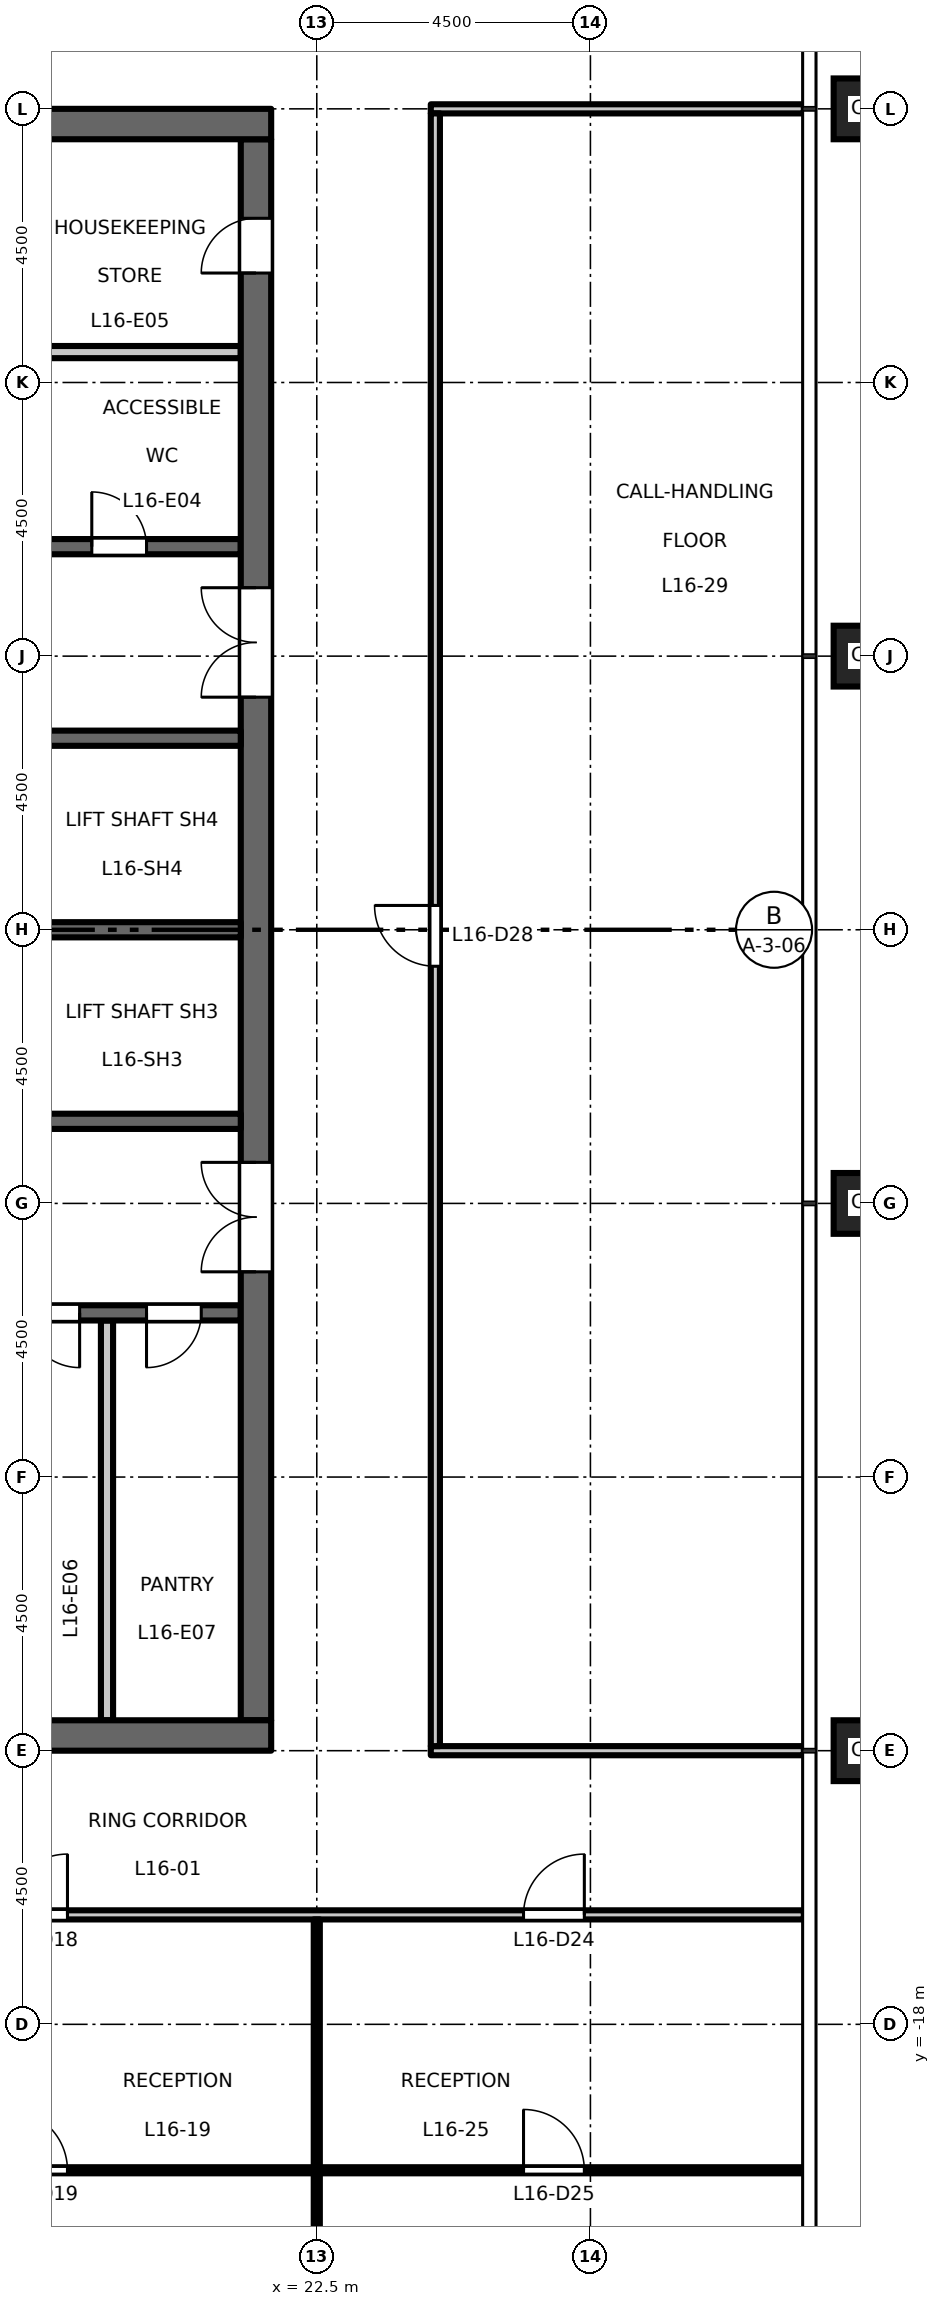
"""IFC4 building model, lengths in metres.
Left out: names, types, materials, properties, quantities, classifications, styles, units other than length and angle.
Written with IfcOpenShell. Run it as: python <this file> out.ifc"""

import sys

from ifc_helpers import new_model, si_unit, direction, frame, frame_2d, origin, origin_2d, place, context, subcontext, project, spatial, rectangle, hollow_rectangle, extrude, element, fill, save


model = new_model("IFC4")
c1 = context("Model", 3, precision=1e-05, world=origin(), true_north=direction((0.0, 1.0)))
c2 = subcontext(c1, "Body", "Model", "MODEL_VIEW")
j1 = project(units=[si_unit("LENGTHUNIT", "METRE"), si_unit("PLANEANGLEUNIT", "RADIAN")], contexts=[c1])
p1 = place(None, origin())
s1 = spatial("IfcSite", under=j1, at=p1, CompositionType="ELEMENT")
p2 = place(p1, origin())
s2 = spatial("IfcBuilding", under=s1, at=p2, CompositionType="ELEMENT")
p3 = place(p2, frame((0.0, 0.0, 76.2)))
s3 = spatial("IfcBuildingStorey", under=s2, at=p3, CompositionType="ELEMENT", Elevation=76.2)
for number, where, z_axis, x_axis in (
    (1, (31.5, -13.5, 0.0), (0.0, 0.0, 1.0), (1.0, 0.0, 0.0)),
    (2, (31.5, -4.5, 0.0), (0.0, 0.0, 1.0), (1.0, 0.0, 0.0)),
    (3, (31.5, 4.5, 0.0), (0.0, 0.0, 1.0), (1.0, 0.0, 0.0)),
    (4, (31.5, 13.5, 0.0), (0.0, 0.0, 1.0), (1.0, 0.0, 0.0)),
):
    element("IfcColumn", number, at=place(p3, frame(where, z_axis=z_axis, x_axis=x_axis)), inside=s3, PredefinedType="COLUMN", context=c2, shape_type="SweptSolid", body=[
        extrude(hollow_rectangle(XDim=1.0, YDim=1.0, WallThickness=0.06, at=origin_2d()), origin(), (0.0, 0.0, 1.0), 4.5),
    ])
p4 = place(p3, frame((17.0, 6.3, 0.0), z_axis=(0.0, 0.0, 1.0), x_axis=(1.0, 0.0, 0.0)))
e5 = element("IfcWall", 5, at=p4, inside=s3, PredefinedType="SHEAR", context=c2, shape_type="SweptSolid", body=[
    extrude(rectangle(XDim=4.25, YDim=0.25, at=frame_2d((2.125, 0.0))), origin(), (0.0, 0.0, 1.0), 4.35),
])
p5 = place(p4, frame((1.8, 0.0, 0.0)))
e6 = element("IfcOpeningElement", 6, at=p5, cuts=e5, PredefinedType="OPENING", context=c2, shape_type="SweptSolid", body=[
    extrude(rectangle(XDim=0.9, YDim=2.1, at=frame_2d((0.45, 1.05))), frame((0.0, 0.135, 0.0), z_axis=(0.0, -1.0, 0.0), x_axis=(1.0, 0.0, 0.0)), (0.0, 0.0, 1.0), 0.27),
])
p6 = place(p3, frame((12.15, -6.3, 0.0), z_axis=(0.0, 0.0, 1.0), x_axis=(1.0, 0.0, 0.0)))
e7 = element("IfcWall", 7, at=p6, inside=s3, PredefinedType="SHEAR", context=c2, shape_type="SweptSolid", body=[
    extrude(rectangle(XDim=9.1, YDim=0.25, at=frame_2d((4.55, 0.0))), origin(), (0.0, 0.0, 1.0), 4.35),
])
p7 = place(p6, frame((1.8, 0.0, 0.0)))
e8 = element("IfcOpeningElement", 8, at=p7, cuts=e7, PredefinedType="OPENING", context=c2, shape_type="SweptSolid", body=[
    extrude(rectangle(XDim=1.0, YDim=2.1, at=frame_2d((0.5, 1.05))), frame((0.0, 0.135, 0.0), z_axis=(0.0, -1.0, 0.0), x_axis=(1.0, 0.0, 0.0)), (0.0, 0.0, 1.0), 0.27),
])
p8 = place(p6, frame((5.55, 0.0, 0.0)))
e9 = element("IfcOpeningElement", 9, at=p8, cuts=e7, PredefinedType="OPENING", context=c2, shape_type="SweptSolid", body=[
    extrude(rectangle(XDim=0.9, YDim=2.1, at=frame_2d((0.45, 1.05))), frame((0.0, 0.135, 0.0), z_axis=(0.0, -1.0, 0.0), x_axis=(1.0, 0.0, 0.0)), (0.0, 0.0, 1.0), 0.27),
])
p9 = place(p6, frame((7.55, 0.0, 0.0)))
e10 = element("IfcOpeningElement", 10, at=p9, cuts=e7, PredefinedType="OPENING", context=c2, shape_type="SweptSolid", body=[
    extrude(rectangle(XDim=0.9, YDim=2.1, at=frame_2d((0.45, 1.05))), frame((0.0, 0.135, 0.0), z_axis=(0.0, -1.0, 0.0), x_axis=(1.0, 0.0, 0.0)), (0.0, 0.0, 1.0), 0.27),
])
p10 = place(p3, frame((21.5, -13.0, 0.0), z_axis=(0.0, 0.0, 1.0), x_axis=(0.0, 1.0, 0.0)))
e11 = element("IfcWall", 11, at=p10, inside=s3, PredefinedType="SHEAR", context=c2, shape_type="SweptSolid", body=[
    extrude(rectangle(XDim=26.0, YDim=0.5, at=frame_2d((13.0, 0.0))), origin(), (0.0, 0.0, 1.0), 4.35),
])
p11 = place(p10, frame((16.825, 0.0, 0.0)))
e12 = element("IfcOpeningElement", 12, at=p11, cuts=e11, PredefinedType="OPENING", context=c2, shape_type="SweptSolid", body=[
    extrude(rectangle(XDim=1.8, YDim=2.1, at=frame_2d((0.9, 1.05))), frame((0.0, 0.26, 0.0), z_axis=(0.0, -1.0, 0.0), x_axis=(1.0, 0.0, 0.0)), (0.0, 0.0, 1.0), 0.52),
])
p12 = place(p10, frame((7.375, 0.0, 0.0)))
e13 = element("IfcOpeningElement", 13, at=p12, cuts=e11, PredefinedType="OPENING", context=c2, shape_type="SweptSolid", body=[
    extrude(rectangle(XDim=1.8, YDim=2.1, at=frame_2d((0.9, 1.05))), frame((0.0, 0.26, 0.0), z_axis=(0.0, -1.0, 0.0), x_axis=(1.0, 0.0, 0.0)), (0.0, 0.0, 1.0), 0.52),
])
p13 = place(p10, frame((23.8, 0.0, 0.0)))
e14 = element("IfcOpeningElement", 14, at=p13, cuts=e11, PredefinedType="OPENING", context=c2, shape_type="SweptSolid", body=[
    extrude(rectangle(XDim=0.9, YDim=2.1, at=frame_2d((0.45, 1.05))), frame((0.0, 0.26, 0.0), z_axis=(0.0, -1.0, 0.0), x_axis=(1.0, 0.0, 0.0)), (0.0, 0.0, 1.0), 0.52),
])
p14 = place(p3, frame((17.25, 9.5, 0.0), z_axis=(0.0, 0.0, 1.0), x_axis=(1.0, 0.0, 0.0)))
e15 = element("IfcWall", 15, at=p14, inside=s3, PredefinedType="PARTITIONING", context=c2, shape_type="SweptSolid", body=[
    extrude(rectangle(XDim=4.0, YDim=0.2, at=frame_2d((2.0, 0.0))), origin(), (0.0, 0.0, 1.0), 4.35),
])
p15 = place(p3, frame((19.05, -13.0, 0.0), z_axis=(0.0, 0.0, 1.0), x_axis=(0.0, 1.0, 0.0)))
e16 = element("IfcWall", 16, at=p15, inside=s3, PredefinedType="PARTITIONING", context=c2, shape_type="SweptSolid", body=[
    extrude(rectangle(XDim=6.575, YDim=0.2, at=frame_2d((3.288, 0.0))), origin(), (0.0, 0.0, 1.0), 4.35),
])
for number, where, z_axis, x_axis in (
    (17, (17.05, 0.0, 0.0), (0.0, 0.0, 1.0), (1.0, 0.0, 0.0)),
    (18, (17.05, 3.15, 0.0), (0.0, 0.0, 1.0), (1.0, 0.0, 0.0)),
    (19, (17.05, -3.15, 0.0), (0.0, 0.0, 1.0), (1.0, 0.0, 0.0)),
):
    element("IfcWall", number, at=place(p3, frame(where, z_axis=z_axis, x_axis=x_axis)), inside=s3, PredefinedType="SHEAR", context=c2, shape_type="SweptSolid", body=[
        extrude(rectangle(XDim=4.2, YDim=0.25, at=frame_2d((2.1, 0.0))), origin(), (0.0, 0.0, 1.0), 4.35),
    ])
for number, where, z_axis, x_axis in (
    (20, (8.25, 13.25, 0.0), (0.0, 0.0, 1.0), (1.0, 0.0, 0.0)),
    (21, (8.25, -13.25, 0.0), (0.0, 0.0, 1.0), (1.0, 0.0, 0.0)),
):
    element("IfcWall", number, at=place(p3, frame(where, z_axis=z_axis, x_axis=x_axis)), inside=s3, PredefinedType="SHEAR", context=c2, shape_type="SweptSolid", body=[
        extrude(rectangle(XDim=13.5, YDim=0.5, at=frame_2d((6.75, 0.0))), origin(), (0.0, 0.0, 1.0), 4.35),
    ])
p16 = place(p3, frame((13.55, -20.4, 0.0), z_axis=(0.0, 0.0, 1.0), x_axis=(1.0, 0.0, 0.0)))
e22 = element("IfcWall", 22, at=p16, inside=s3, PredefinedType="PARTITIONING", context=c2, shape_type="SweptSolid", body=[
    extrude(rectangle(XDim=16.96, YDim=0.1, at=frame_2d((8.48, 0.0))), origin(), (0.0, 0.0, 1.0), 4.35),
])
p17 = place(p16, frame((3.85, 0.0, 0.0)))
e23 = element("IfcOpeningElement", 23, at=p17, cuts=e22, PredefinedType="OPENING", context=c2, shape_type="SweptSolid", body=[
    extrude(rectangle(XDim=1.0, YDim=2.1, at=frame_2d((0.5, 1.05))), frame((0.0, 0.06, 0.0), z_axis=(0.0, -1.0, 0.0), x_axis=(1.0, 0.0, 0.0)), (0.0, 0.0, 1.0), 0.12),
])
p18 = place(p16, frame((12.35, 0.0, 0.0)))
e24 = element("IfcOpeningElement", 24, at=p18, cuts=e22, PredefinedType="OPENING", context=c2, shape_type="SweptSolid", body=[
    extrude(rectangle(XDim=1.0, YDim=2.1, at=frame_2d((0.5, 1.05))), frame((0.0, 0.06, 0.0), z_axis=(0.0, -1.0, 0.0), x_axis=(1.0, 0.0, 0.0)), (0.0, 0.0, 1.0), 0.12),
])
p19 = place(p3, frame((-30.51, -16.2, 0.0), z_axis=(0.0, 0.0, 1.0), x_axis=(1.0, 0.0, 0.0)))
e25 = element("IfcWall", 25, at=p19, inside=s3, PredefinedType="PARTITIONING", context=c2, shape_type="SweptSolid", body=[
    extrude(rectangle(XDim=61.02, YDim=0.15, at=frame_2d((30.51, 0.0))), origin(), (0.0, 0.0, 1.0), 4.35),
])
p20 = place(p19, frame((11.91, 0.0, 0.0)))
e26 = element("IfcOpeningElement", 26, at=p20, cuts=e25, PredefinedType="OPENING", context=c2, shape_type="SweptSolid", body=[
    extrude(rectangle(XDim=1.0, YDim=2.1, at=frame_2d((0.5, 1.05))), frame((0.0, 0.085, 0.0), z_axis=(0.0, -1.0, 0.0), x_axis=(1.0, 0.0, 0.0)), (0.0, 0.0, 1.0), 0.17),
])
p21 = place(p19, frame((20.91, 0.0, 0.0)))
e27 = element("IfcOpeningElement", 27, at=p21, cuts=e25, PredefinedType="OPENING", context=c2, shape_type="SweptSolid", body=[
    extrude(rectangle(XDim=1.0, YDim=2.1, at=frame_2d((0.5, 1.05))), frame((0.0, 0.085, 0.0), z_axis=(0.0, -1.0, 0.0), x_axis=(1.0, 0.0, 0.0)), (0.0, 0.0, 1.0), 0.17),
])
p22 = place(p19, frame((29.91, 0.0, 0.0)))
e28 = element("IfcOpeningElement", 28, at=p22, cuts=e25, PredefinedType="OPENING", context=c2, shape_type="SweptSolid", body=[
    extrude(rectangle(XDim=1.0, YDim=2.1, at=frame_2d((0.5, 1.05))), frame((0.0, 0.085, 0.0), z_axis=(0.0, -1.0, 0.0), x_axis=(1.0, 0.0, 0.0)), (0.0, 0.0, 1.0), 0.17),
])
p23 = place(p19, frame((38.91, 0.0, 0.0)))
e29 = element("IfcOpeningElement", 29, at=p23, cuts=e25, PredefinedType="OPENING", context=c2, shape_type="SweptSolid", body=[
    extrude(rectangle(XDim=1.0, YDim=2.1, at=frame_2d((0.5, 1.05))), frame((0.0, 0.085, 0.0), z_axis=(0.0, -1.0, 0.0), x_axis=(1.0, 0.0, 0.0)), (0.0, 0.0, 1.0), 0.17),
])
p24 = place(p19, frame((47.91, 0.0, 0.0)))
e30 = element("IfcOpeningElement", 30, at=p24, cuts=e25, PredefinedType="OPENING", context=c2, shape_type="SweptSolid", body=[
    extrude(rectangle(XDim=1.0, YDim=2.1, at=frame_2d((0.5, 1.05))), frame((0.0, 0.085, 0.0), z_axis=(0.0, -1.0, 0.0), x_axis=(1.0, 0.0, 0.0)), (0.0, 0.0, 1.0), 0.17),
])
p25 = place(p19, frame((3.4, 0.0, 0.0)))
e31 = element("IfcOpeningElement", 31, at=p25, cuts=e25, PredefinedType="OPENING", context=c2, shape_type="SweptSolid", body=[
    extrude(rectangle(XDim=1.0, YDim=2.1, at=frame_2d((0.5, 1.05))), frame((0.0, 0.085, 0.0), z_axis=(0.0, -1.0, 0.0), x_axis=(1.0, 0.0, 0.0)), (0.0, 0.0, 1.0), 0.17),
])
p26 = place(p19, frame((56.41, 0.0, 0.0)))
e32 = element("IfcOpeningElement", 32, at=p26, cuts=e25, PredefinedType="OPENING", context=c2, shape_type="SweptSolid", body=[
    extrude(rectangle(XDim=1.0, YDim=2.1, at=frame_2d((0.5, 1.05))), frame((0.0, 0.085, 0.0), z_axis=(0.0, -1.0, 0.0), x_axis=(1.0, 0.0, 0.0)), (0.0, 0.0, 1.0), 0.17),
])
for number, where, z_axis, x_axis in (
    (33, (24.375, -13.5, 0.0), (0.0, 0.0, 1.0), (1.0, 0.0, 0.0)),
    (34, (24.375, 13.5, 0.0), (0.0, 0.0, 1.0), (1.0, 0.0, 0.0)),
):
    element("IfcWall", number, at=place(p3, frame(where, z_axis=z_axis, x_axis=x_axis)), inside=s3, PredefinedType="PARTITIONING", context=c2, shape_type="SweptSolid", body=[
        extrude(rectangle(XDim=6.135, YDim=0.15, at=frame_2d((3.067, 0.0))), origin(), (0.0, 0.0, 1.0), 3.35),
    ])
p27 = place(p3, frame((22.5, -30.428, 0.0), z_axis=(0.0, 0.0, 1.0), x_axis=(0.0, 1.0, 0.0)))
e35 = element("IfcWall", 35, at=p27, inside=s3, PredefinedType="PARTITIONING", context=c2, shape_type="SweptSolid", body=[
    extrude(rectangle(XDim=9.978, YDim=0.1, at=frame_2d((4.989, 0.0))), origin(), (0.0, 0.0, 1.0), 3.35),
])
p28 = place(p3, frame((22.5, -20.35, 0.0), z_axis=(0.0, 0.0, 1.0), x_axis=(0.0, 1.0, 0.0)))
e36 = element("IfcWall", 36, at=p28, inside=s3, PredefinedType="PARTITIONING", context=c2, shape_type="SweptSolid", body=[
    extrude(rectangle(XDim=4.075, YDim=0.1, at=frame_2d((2.038, 0.0))), origin(), (0.0, 0.0, 1.0), 3.35),
])
p29 = place(p3, frame((24.45, -13.425, 0.0), z_axis=(0.0, 0.0, 1.0), x_axis=(0.0, 1.0, 0.0)))
e37 = element("IfcWall", 37, at=p29, inside=s3, PredefinedType="PARTITIONING", context=c2, shape_type="SweptSolid", body=[
    extrude(rectangle(XDim=26.85, YDim=0.15, at=frame_2d((13.425, 0.0))), origin(), (0.0, 0.0, 1.0), 4.35),
])
p30 = place(p29, frame((12.825, 0.0, 0.0)))
e38 = element("IfcOpeningElement", 38, at=p30, cuts=e37, PredefinedType="OPENING", context=c2, shape_type="SweptSolid", body=[
    extrude(rectangle(XDim=1.0, YDim=2.1, at=frame_2d((0.5, 1.05))), frame((0.0, 0.085, 0.0), z_axis=(0.0, -1.0, 0.0), x_axis=(1.0, 0.0, 0.0)), (0.0, 0.0, 1.0), 0.17),
])
p31 = place(p11, origin())
e39 = element("IfcDoor", 39, at=p31, inside=s3, OperationType="DOUBLE_DOOR_DOUBLE_SWING", PredefinedType="DOOR", context=c2, shape_type="SweptSolid", body=[
    extrude(rectangle(XDim=1.8, YDim=2.1, at=frame_2d((0.9, 1.05))), frame((0.0, 0.025, 0.0), z_axis=(0.0, -1.0, 0.0), x_axis=(1.0, 0.0, 0.0)), (0.0, 0.0, 1.0), 0.05),
])
fill(e12, e39)
p32 = place(p12, origin())
e40 = element("IfcDoor", 40, at=p32, inside=s3, OperationType="DOUBLE_DOOR_DOUBLE_SWING", PredefinedType="DOOR", context=c2, shape_type="SweptSolid", body=[
    extrude(rectangle(XDim=1.8, YDim=2.1, at=frame_2d((0.9, 1.05))), frame((0.0, 0.025, 0.0), z_axis=(0.0, -1.0, 0.0), x_axis=(1.0, 0.0, 0.0)), (0.0, 0.0, 1.0), 0.05),
])
fill(e13, e40)
p33 = place(p5, origin())
e41 = element("IfcDoor", 41, at=p33, inside=s3, OperationType="SINGLE_SWING_RIGHT", PredefinedType="DOOR", context=c2, shape_type="SweptSolid", body=[
    extrude(rectangle(XDim=0.9, YDim=2.1, at=frame_2d((0.45, 1.05))), frame((0.0, 0.025, 0.0), z_axis=(0.0, -1.0, 0.0), x_axis=(1.0, 0.0, 0.0)), (0.0, 0.0, 1.0), 0.05),
])
fill(e6, e41)
p34 = place(p13, origin())
e42 = element("IfcDoor", 42, at=p34, inside=s3, OperationType="SINGLE_SWING_RIGHT", PredefinedType="DOOR", context=c2, shape_type="SweptSolid", body=[
    extrude(rectangle(XDim=0.9, YDim=2.1, at=frame_2d((0.45, 1.05))), frame((0.0, 0.025, 0.0), z_axis=(0.0, -1.0, 0.0), x_axis=(1.0, 0.0, 0.0)), (0.0, 0.0, 1.0), 0.05),
])
fill(e14, e42)
p35 = place(p8, origin())
e43 = element("IfcDoor", 43, at=p35, inside=s3, OperationType="SINGLE_SWING_RIGHT", PredefinedType="DOOR", context=c2, shape_type="SweptSolid", body=[
    extrude(rectangle(XDim=0.9, YDim=2.1, at=frame_2d((0.45, 1.05))), frame((0.0, 0.025, 0.0), z_axis=(0.0, -1.0, 0.0), x_axis=(1.0, 0.0, 0.0)), (0.0, 0.0, 1.0), 0.05),
])
fill(e9, e43)
p36 = place(p9, origin())
e44 = element("IfcDoor", 44, at=p36, inside=s3, OperationType="SINGLE_SWING_LEFT", PredefinedType="DOOR", context=c2, shape_type="SweptSolid", body=[
    extrude(rectangle(XDim=0.9, YDim=2.1, at=frame_2d((0.45, 1.05))), frame((0.0, 0.025, 0.0), z_axis=(0.0, -1.0, 0.0), x_axis=(1.0, 0.0, 0.0)), (0.0, 0.0, 1.0), 0.05),
])
fill(e10, e44)
p37 = place(p24, origin())
e45 = element("IfcDoor", 45, at=p37, inside=s3, OperationType="SINGLE_SWING_RIGHT", PredefinedType="DOOR", context=c2, shape_type="SweptSolid", body=[
    extrude(rectangle(XDim=1.0, YDim=2.1, at=frame_2d((0.5, 1.05))), frame((0.0, 0.025, 0.0), z_axis=(0.0, -1.0, 0.0), x_axis=(1.0, 0.0, 0.0)), (0.0, 0.0, 1.0), 0.05),
])
fill(e30, e45)
p38 = place(p17, origin())
e46 = element("IfcDoor", 46, at=p38, inside=s3, OperationType="SINGLE_SWING_LEFT", PredefinedType="DOOR", context=c2, shape_type="SweptSolid", body=[
    extrude(rectangle(XDim=1.0, YDim=2.1, at=frame_2d((0.5, 1.05))), frame((0.0, 0.025, 0.0), z_axis=(0.0, -1.0, 0.0), x_axis=(1.0, 0.0, 0.0)), (0.0, 0.0, 1.0), 0.05),
])
fill(e23, e46)
p39 = place(p26, origin())
e47 = element("IfcDoor", 47, at=p39, inside=s3, OperationType="SINGLE_SWING_RIGHT", PredefinedType="DOOR", context=c2, shape_type="SweptSolid", body=[
    extrude(rectangle(XDim=1.0, YDim=2.1, at=frame_2d((0.5, 1.05))), frame((0.0, 0.025, 0.0), z_axis=(0.0, -1.0, 0.0), x_axis=(1.0, 0.0, 0.0)), (0.0, 0.0, 1.0), 0.05),
])
fill(e32, e47)
p40 = place(p18, origin())
e48 = element("IfcDoor", 48, at=p40, inside=s3, OperationType="SINGLE_SWING_LEFT", PredefinedType="DOOR", context=c2, shape_type="SweptSolid", body=[
    extrude(rectangle(XDim=1.0, YDim=2.1, at=frame_2d((0.5, 1.05))), frame((0.0, 0.025, 0.0), z_axis=(0.0, -1.0, 0.0), x_axis=(1.0, 0.0, 0.0)), (0.0, 0.0, 1.0), 0.05),
])
fill(e24, e48)
p41 = place(p30, origin())
e49 = element("IfcDoor", 49, at=p41, inside=s3, OperationType="SINGLE_SWING_RIGHT", PredefinedType="DOOR", context=c2, shape_type="SweptSolid", body=[
    extrude(rectangle(XDim=1.0, YDim=2.1, at=frame_2d((0.5, 1.05))), frame((0.0, 0.025, 0.0), z_axis=(0.0, -1.0, 0.0), x_axis=(1.0, 0.0, 0.0)), (0.0, 0.0, 1.0), 0.05),
])
fill(e38, e49)
save(model, sys.argv[1])
